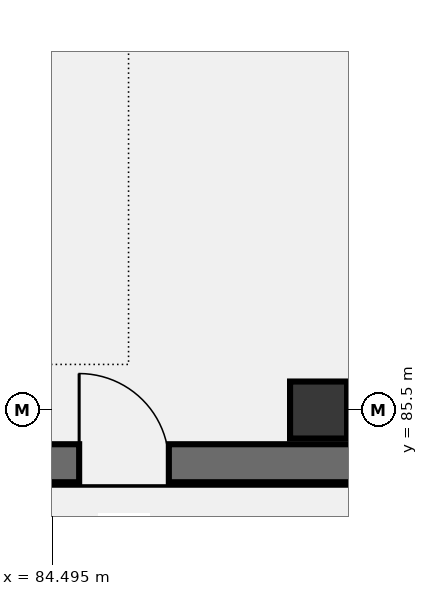
"""IFC4 building model, lengths in metres.
Left out: names, types, materials, properties, quantities, classifications, styles, units other than length and angle.
Written with IfcOpenShell. Run it as: python <this file> out.ifc"""

import sys

from ifc_helpers import new_model, si_unit, direction, frame, frame_2d, origin, origin_2d, place, context, subcontext, project, spatial, rectangle, extrude, element, fill, save


model = new_model("IFC4")
c1 = context("Model", 3, precision=1e-05, world=origin(), true_north=direction((0.0, 1.0)))
c2 = subcontext(c1, "Body", "Model", "MODEL_VIEW")
j1 = project(units=[si_unit("LENGTHUNIT", "METRE"), si_unit("PLANEANGLEUNIT", "RADIAN")], contexts=[c1])
p1 = place(None, origin())
s1 = spatial("IfcSite", under=j1, at=p1, CompositionType="ELEMENT")
p2 = place(p1, origin())
s2 = spatial("IfcBuilding", under=s1, at=p2, CompositionType="ELEMENT")
p3 = place(p2, frame((0.0, 0.0, -8.4)))
s3 = spatial("IfcBuildingStorey", under=s2, at=p3, CompositionType="ELEMENT", Elevation=-8.4)
p4 = place(p3, frame((29.05, 84.8, 0.0), z_axis=(0.0, 0.0, 1.0), x_axis=(1.0, 0.0, 0.0)))
e1 = element("IfcWall", 1, at=p4, inside=s3, PredefinedType="USERDEFINED", context=c2, shape_type="SweptSolid", body=[
    extrude(rectangle(XDim=94.35, YDim=0.5, at=frame_2d((47.175, 0.0))), origin(), (0.0, 0.0, 1.0), 3.92),
])
p5 = place(p4, frame((55.8, 0.0, 0.0)))
e2 = element("IfcOpeningElement", 2, at=p5, cuts=e1, PredefinedType="OPENING", context=c2, shape_type="SweptSolid", body=[
    extrude(rectangle(XDim=1.18, YDim=2.24, at=frame_2d((0.59, 1.12))), frame((0.0, 0.26, 0.0), z_axis=(0.0, -1.0, 0.0), x_axis=(1.0, 0.0, 0.0)), (0.0, 0.0, 1.0), 0.52),
])
p6 = place(p3, frame((88.0, 85.5, -0.44), z_axis=(0.0, 0.0, 1.0), x_axis=(1.0, 0.0, 0.0)))
e3 = element("IfcColumn", 3, at=p6, inside=s3, PredefinedType="COLUMN", context=c2, shape_type="SweptSolid", body=[
    extrude(rectangle(XDim=0.75, YDim=0.75, at=origin_2d()), origin(), (0.0, 0.0, 1.0), 4.64),
])
p7 = place(p5, origin())
e4 = element("IfcDoor", 4, at=p7, inside=s3, OperationType="SINGLE_SWING_LEFT", PredefinedType="DOOR", context=c2, shape_type="SweptSolid", body=[
    extrude(rectangle(XDim=1.18, YDim=2.24, at=frame_2d((0.59, 1.12))), frame((0.0, 0.025, 0.0), z_axis=(0.0, -1.0, 0.0), x_axis=(1.0, 0.0, 0.0)), (0.0, 0.0, 1.0), 0.05),
])
fill(e2, e4)
save(model, sys.argv[1])
